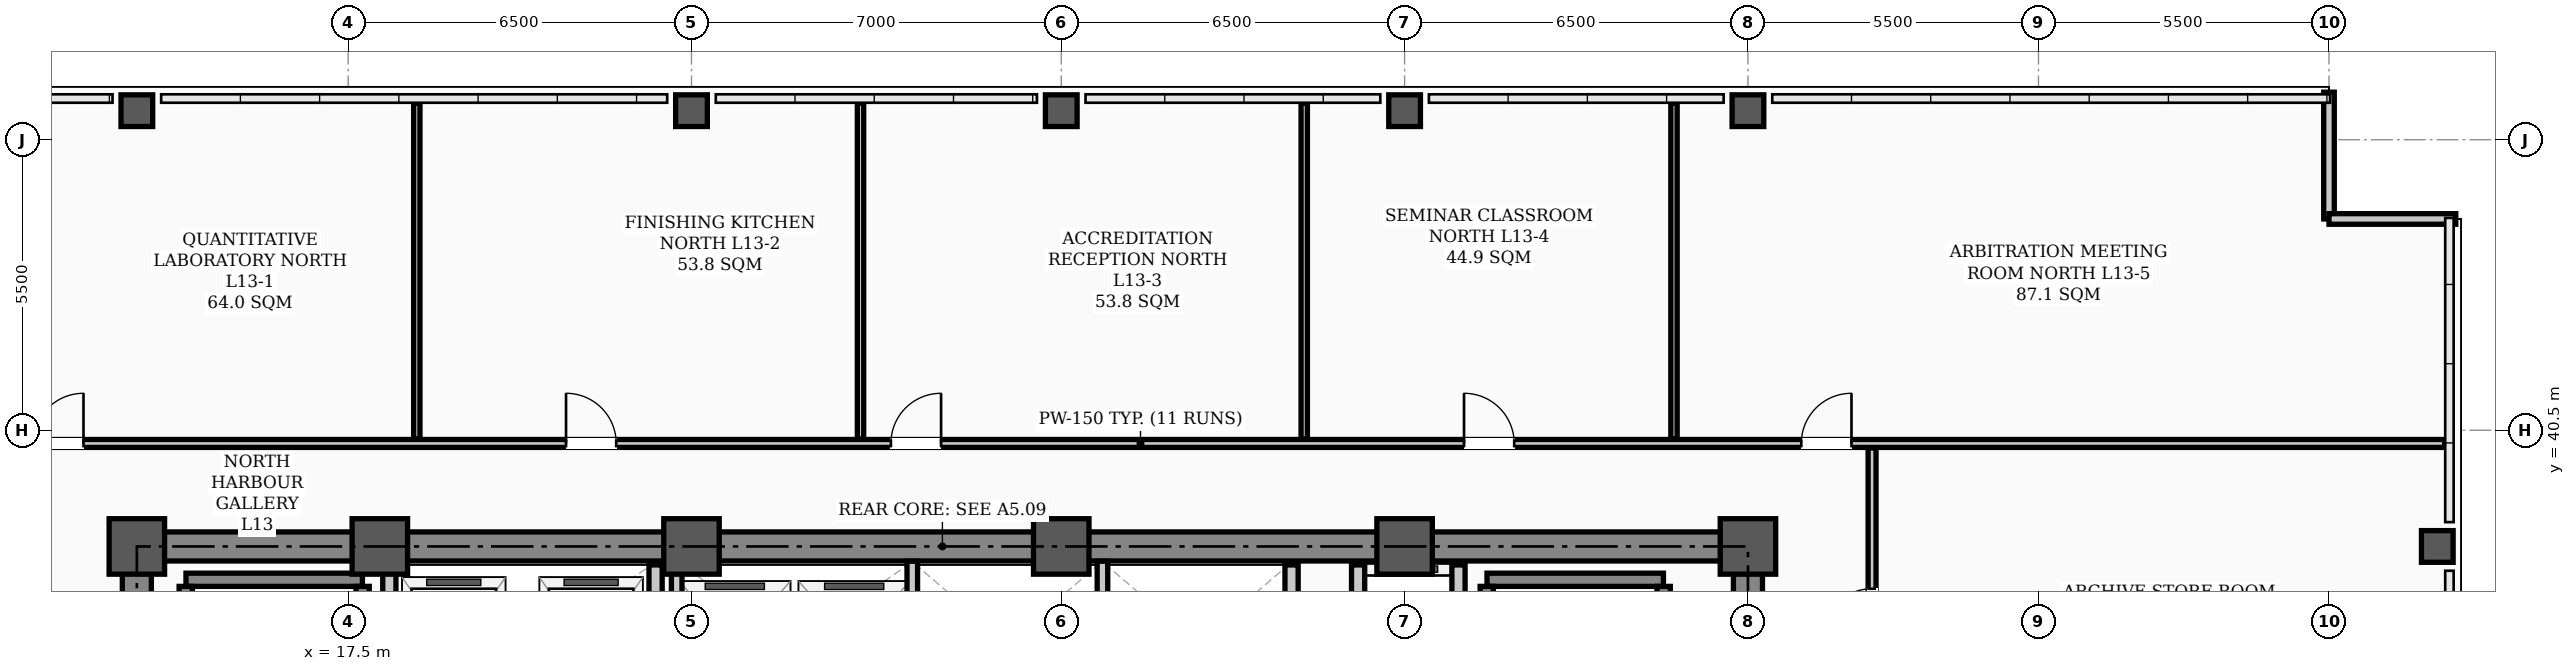
"""IFC4 building model, lengths in metres.
Left out: names, types, materials, properties, quantities, classifications, styles, units other than length and angle.
Written with IfcOpenShell. Run it as: python <this file> out.ifc"""

import sys

from ifc_helpers import new_model, si_unit, direction, frame, frame_2d, origin, origin_2d, place, context, subcontext, project, spatial, rectangle, hollow_rectangle, extrude, element, fill, save


model = new_model("IFC4")
c1 = context("Model", 3, precision=1e-05, world=origin(), true_north=direction((0.0, 1.0)))
c2 = subcontext(c1, "Body", "Model", "MODEL_VIEW")
j1 = project(units=[si_unit("LENGTHUNIT", "METRE"), si_unit("PLANEANGLEUNIT", "RADIAN")], contexts=[c1])
p1 = place(None, origin())
s1 = spatial("IfcSite", under=j1, at=p1, CompositionType="ELEMENT")
p2 = place(p1, origin())
s2 = spatial("IfcBuilding", under=s1, at=p2, CompositionType="ELEMENT")
p3 = place(p2, frame((0.0, 0.0, 53.8)))
s3 = spatial("IfcBuildingStorey", under=s2, at=p3, CompositionType="ELEMENT", Elevation=53.8)
for number, where, z_axis, x_axis in (
    (1, (13.5, 38.3, 0.0), (0.0, 0.0, 1.0), (1.0, 0.0, 0.0)),
    (2, (18.1, 38.3, 0.0), (0.0, 0.0, 1.0), (1.0, 0.0, 0.0)),
    (3, (24.0, 38.3, 0.0), (0.0, 0.0, 1.0), (1.0, 0.0, 0.0)),
    (4, (31.0, 38.3, 0.0), (0.0, 0.0, 1.0), (1.0, 0.0, 0.0)),
    (5, (37.5, 38.3, 0.0), (0.0, 0.0, 1.0), (1.0, 0.0, 0.0)),
    (6, (44.0, 38.3, 0.0), (0.0, 0.0, 1.0), (1.0, 0.0, 0.0)),
):
    element("IfcColumn", number, at=place(p3, frame(where, z_axis=z_axis, x_axis=x_axis)), inside=s3, PredefinedType="COLUMN", context=c2, shape_type="SweptSolid", body=[
        extrude(hollow_rectangle(XDim=1.05, YDim=1.05, WallThickness=0.038, InnerFilletRadius=0.019, OuterFilletRadius=0.057, at=origin_2d()), origin(), (0.0, 0.0, 1.0), 3.9),
    ])
for number, where, z_axis, x_axis in (
    (7, (13.5, 46.55, 0.0), (0.0, 0.0, 1.0), (1.0, 0.0, 0.0)),
    (8, (24.0, 46.55, 0.0), (0.0, 0.0, 1.0), (1.0, 0.0, 0.0)),
    (9, (31.0, 46.55, 0.0), (0.0, 0.0, 1.0), (1.0, 0.0, 0.0)),
    (10, (37.5, 46.55, 0.0), (0.0, 0.0, 1.0), (1.0, 0.0, 0.0)),
    (11, (44.0, 46.55, 0.0), (0.0, 0.0, 1.0), (1.0, 0.0, 0.0)),
    (12, (57.05, 38.3, 0.0), (0.0, 0.0, 1.0), (1.0, 0.0, 0.0)),
):
    element("IfcColumn", number, at=place(p3, frame(where, z_axis=z_axis, x_axis=x_axis)), inside=s3, PredefinedType="COLUMN", context=c2, shape_type="SweptSolid", body=[
        extrude(hollow_rectangle(XDim=0.6, YDim=0.6, WallThickness=0.026, InnerFilletRadius=0.013, OuterFilletRadius=0.039, at=origin_2d()), origin(), (0.0, 0.0, 1.0), 3.9),
    ])
for number, where, z_axis, x_axis in (
    (13, (55.0, 46.9, 0.0), (0.0, 0.0, 1.0), (0.0, -1.0, 0.0)),
    (14, (55.0, 44.5, 0.0), (0.0, 0.0, 1.0), (1.0, 0.0, 0.0)),
):
    element("IfcWall", number, at=place(p3, frame(where, z_axis=z_axis, x_axis=x_axis)), inside=s3, PredefinedType="PARAPET", context=c2, shape_type="SweptSolid", body=[
        extrude(rectangle(XDim=2.4, YDim=0.2, at=frame_2d((1.2, 0.0))), origin(), (0.0, 0.0, 1.0), 1.2),
    ])
p4 = place(p3, frame((13.5, 38.3, 0.0), z_axis=(0.0, 0.0, 1.0), x_axis=(1.0, 0.0, 0.0)))
e15 = element("IfcWall", 15, at=p4, inside=s3, PredefinedType="SHEAR", context=c2, shape_type="SweptSolid", body=[
    extrude(rectangle(XDim=30.5, YDim=0.55, at=frame_2d((15.25, 0.0))), origin(), (0.0, 0.0, 1.0), 3.72),
])
for number, where, z_axis, x_axis in (
    (16, (13.5, 29.35, 0.0), (0.0, 0.0, 1.0), (0.0, 1.0, 0.0)),
    (17, (44.0, 29.35, 0.0), (0.0, 0.0, 1.0), (0.0, 1.0, 0.0)),
):
    element("IfcWall", number, at=place(p3, frame(where, z_axis=z_axis, x_axis=x_axis)), inside=s3, PredefinedType="SHEAR", context=c2, shape_type="SweptSolid", body=[
        extrude(rectangle(XDim=8.6, YDim=0.55, at=frame_2d((4.3, 0.0))), origin(), (0.0, 0.0, 1.0), 3.72),
    ])
p5 = place(p3, frame((14.43, 37.669, 0.0), z_axis=(0.0, 0.0, 1.0), x_axis=(1.0, 0.0, 0.0)))
e18 = element("IfcWall", 18, at=p5, inside=s3, PredefinedType="STANDARD", context=c2, shape_type="SweptSolid", body=[
    extrude(rectangle(XDim=3.34, YDim=0.25, at=frame_2d((1.67, 0.0))), origin(), (0.0, 0.0, 1.0), 3.72),
])
for number, where, z_axis, x_axis in (
    (19, (14.425, 30.36, 0.0), (0.0, 0.0, 1.0), (0.0, 1.0, 0.0)),
    (20, (17.775, 30.36, 0.0), (0.0, 0.0, 1.0), (0.0, 1.0, 0.0)),
):
    element("IfcWall", number, at=place(p3, frame(where, z_axis=z_axis, x_axis=x_axis)), inside=s3, PredefinedType="STANDARD", context=c2, shape_type="SweptSolid", body=[
        extrude(rectangle(XDim=7.184, YDim=0.25, at=frame_2d((3.592, 0.0))), origin(), (0.0, 0.0, 1.0), 3.72),
    ])
p6 = place(p3, frame((39.06, 37.669, 0.0), z_axis=(0.0, 0.0, 1.0), x_axis=(1.0, 0.0, 0.0)))
e21 = element("IfcWall", 21, at=p6, inside=s3, PredefinedType="STANDARD", context=c2, shape_type="SweptSolid", body=[
    extrude(rectangle(XDim=3.34, YDim=0.25, at=frame_2d((1.67, 0.0))), origin(), (0.0, 0.0, 1.0), 3.72),
])
for number, where, z_axis, x_axis in (
    (22, (39.055, 30.36, 0.0), (0.0, 0.0, 1.0), (0.0, 1.0, 0.0)),
    (23, (42.405, 30.36, 0.0), (0.0, 0.0, 1.0), (0.0, 1.0, 0.0)),
):
    element("IfcWall", number, at=place(p3, frame(where, z_axis=z_axis, x_axis=x_axis)), inside=s3, PredefinedType="STANDARD", context=c2, shape_type="SweptSolid", body=[
        extrude(rectangle(XDim=7.184, YDim=0.25, at=frame_2d((3.592, 0.0))), origin(), (0.0, 0.0, 1.0), 3.72),
    ])
p7 = place(p3, frame((36.62, 31.95, 0.0), z_axis=(0.0, 0.0, 1.0), x_axis=(0.0, 1.0, 0.0)))
e24 = element("IfcWall", 24, at=p7, inside=s3, PredefinedType="STANDARD", context=c2, shape_type="SweptSolid", body=[
    extrude(rectangle(XDim=6.0, YDim=0.25, at=frame_2d((3.0, 0.0))), origin(), (0.0, 0.0, 1.0), 3.3),
])
p8 = place(p7, frame((0.9, 0.0, 0.0)))
e25 = element("IfcOpeningElement", 25, at=p8, cuts=e24, PredefinedType="OPENING", context=c2, shape_type="SweptSolid", body=[
    extrude(rectangle(XDim=1.1, YDim=2.08, at=frame_2d((0.55, 1.04))), frame((0.0, 0.135, 0.0), z_axis=(0.0, -1.0, 0.0), x_axis=(1.0, 0.0, 0.0)), (0.0, 0.0, 1.0), 0.27),
])
p9 = place(p7, frame((4.0, 0.0, 0.0)))
e26 = element("IfcOpeningElement", 26, at=p9, cuts=e24, PredefinedType="OPENING", context=c2, shape_type="SweptSolid", body=[
    extrude(rectangle(XDim=1.1, YDim=2.08, at=frame_2d((0.55, 1.04))), frame((0.0, 0.135, 0.0), z_axis=(0.0, -1.0, 0.0), x_axis=(1.0, 0.0, 0.0)), (0.0, 0.0, 1.0), 0.27),
])
p10 = place(p3, frame((38.52, 31.95, 0.0), z_axis=(0.0, 0.0, 1.0), x_axis=(0.0, 1.0, 0.0)))
e27 = element("IfcWall", 27, at=p10, inside=s3, PredefinedType="STANDARD", context=c2, shape_type="SweptSolid", body=[
    extrude(rectangle(XDim=6.0, YDim=0.25, at=frame_2d((3.0, 0.0))), origin(), (0.0, 0.0, 1.0), 3.3),
])
for number, where, z_axis, x_axis in (
    (28, (18.28, 34.62, 0.0), (0.0, 0.0, 1.0), (0.0, 1.0, 0.0)),
    (29, (23.32, 34.62, 0.0), (0.0, 0.0, 1.0), (0.0, 1.0, 0.0)),
):
    element("IfcWall", number, at=place(p3, frame(where, z_axis=z_axis, x_axis=x_axis)), inside=s3, PredefinedType="STANDARD", context=c2, shape_type="SweptSolid", body=[
        extrude(rectangle(XDim=3.33, YDim=0.25, at=frame_2d((1.665, 0.0))), origin(), (0.0, 0.0, 1.0), 3.3),
    ])
p11 = place(p3, frame((35.36, 34.9, 0.0), z_axis=(0.0, 0.0, 1.0), x_axis=(0.0, 1.0, 0.0)))
e30 = element("IfcWall", 30, at=p11, inside=s3, PredefinedType="STANDARD", context=c2, shape_type="SweptSolid", body=[
    extrude(rectangle(XDim=3.05, YDim=0.25, at=frame_2d((1.525, 0.0))), origin(), (0.0, 0.0, 1.0), 3.3),
])
p12 = place(p3, frame((7.81, 40.25, 0.0), z_axis=(0.0, 0.0, 1.0), x_axis=(1.0, 0.0, 0.0)))
e31 = element("IfcWall", 31, at=p12, inside=s3, PredefinedType="PARTITIONING", context=c2, shape_type="SweptSolid", body=[
    extrude(rectangle(XDim=49.38, YDim=0.15, at=frame_2d((24.69, 0.0))), origin(), (0.0, 0.0, 1.0), 3.1),
])
p13 = place(p12, frame((3.73, 0.0, 0.0)))
e32 = element("IfcOpeningElement", 32, at=p13, cuts=e31, PredefinedType="OPENING", context=c2, shape_type="SweptSolid", body=[
    extrude(rectangle(XDim=0.95, YDim=2.08, at=frame_2d((0.475, 1.04))), frame((0.0, 0.085, 0.0), z_axis=(0.0, -1.0, 0.0), x_axis=(1.0, 0.0, 0.0)), (0.0, 0.0, 1.0), 0.17),
])
p14 = place(p12, frame((13.815, 0.0, 0.0)))
e33 = element("IfcOpeningElement", 33, at=p14, cuts=e31, PredefinedType="OPENING", context=c2, shape_type="SweptSolid", body=[
    extrude(rectangle(XDim=0.95, YDim=2.08, at=frame_2d((0.475, 1.04))), frame((0.0, 0.085, 0.0), z_axis=(0.0, -1.0, 0.0), x_axis=(1.0, 0.0, 0.0)), (0.0, 0.0, 1.0), 0.17),
])
p15 = place(p12, frame((19.965, 0.0, 0.0)))
e34 = element("IfcOpeningElement", 34, at=p15, cuts=e31, PredefinedType="OPENING", context=c2, shape_type="SweptSolid", body=[
    extrude(rectangle(XDim=0.95, YDim=2.08, at=frame_2d((0.475, 1.04))), frame((0.0, 0.085, 0.0), z_axis=(0.0, -1.0, 0.0), x_axis=(1.0, 0.0, 0.0)), (0.0, 0.0, 1.0), 0.17),
])
p16 = place(p12, frame((30.815, 0.0, 0.0)))
e35 = element("IfcOpeningElement", 35, at=p16, cuts=e31, PredefinedType="OPENING", context=c2, shape_type="SweptSolid", body=[
    extrude(rectangle(XDim=0.95, YDim=2.08, at=frame_2d((0.475, 1.04))), frame((0.0, 0.085, 0.0), z_axis=(0.0, -1.0, 0.0), x_axis=(1.0, 0.0, 0.0)), (0.0, 0.0, 1.0), 0.17),
])
p17 = place(p12, frame((37.2, 0.0, 0.0)))
e36 = element("IfcOpeningElement", 36, at=p17, cuts=e31, PredefinedType="OPENING", context=c2, shape_type="SweptSolid", body=[
    extrude(rectangle(XDim=0.95, YDim=2.08, at=frame_2d((0.475, 1.04))), frame((0.0, 0.085, 0.0), z_axis=(0.0, -1.0, 0.0), x_axis=(1.0, 0.0, 0.0)), (0.0, 0.0, 1.0), 0.17),
])
p18 = place(p3, frame((46.35, 17.635, 0.0), z_axis=(0.0, 0.0, 1.0), x_axis=(0.0, 1.0, 0.0)))
e37 = element("IfcWall", 37, at=p18, inside=s3, PredefinedType="PARTITIONING", context=c2, shape_type="SweptSolid", body=[
    extrude(rectangle(XDim=22.53, YDim=0.15, at=frame_2d((11.265, 0.0))), origin(), (0.0, 0.0, 1.0), 3.0),
])
p19 = place(p18, frame((4.265, 0.0, 0.0)))
e38 = element("IfcOpeningElement", 38, at=p19, cuts=e37, PredefinedType="OPENING", context=c2, shape_type="SweptSolid", body=[
    extrude(rectangle(XDim=0.95, YDim=2.08, at=frame_2d((0.475, 1.04))), frame((0.0, 0.085, 0.0), z_axis=(0.0, -1.0, 0.0), x_axis=(1.0, 0.0, 0.0)), (0.0, 0.0, 1.0), 0.17),
])
p20 = place(p18, frame((12.39, 0.0, 0.0)))
e39 = element("IfcOpeningElement", 39, at=p20, cuts=e37, PredefinedType="OPENING", context=c2, shape_type="SweptSolid", body=[
    extrude(rectangle(XDim=0.95, YDim=2.08, at=frame_2d((0.475, 1.04))), frame((0.0, 0.085, 0.0), z_axis=(0.0, -1.0, 0.0), x_axis=(1.0, 0.0, 0.0)), (0.0, 0.0, 1.0), 0.17),
])
p21 = place(p18, frame((18.915, 0.0, 0.0)))
e40 = element("IfcOpeningElement", 40, at=p21, cuts=e37, PredefinedType="OPENING", context=c2, shape_type="SweptSolid", body=[
    extrude(rectangle(XDim=0.95, YDim=2.08, at=frame_2d((0.475, 1.04))), frame((0.0, 0.085, 0.0), z_axis=(0.0, -1.0, 0.0), x_axis=(1.0, 0.0, 0.0)), (0.0, 0.0, 1.0), 0.17),
])
for number, where, z_axis, x_axis in (
    (41, (18.8, 40.335, 0.0), (0.0, 0.0, 1.0), (0.0, 1.0, 0.0)),
    (42, (27.2, 40.335, 0.0), (0.0, 0.0, 1.0), (0.0, 1.0, 0.0)),
    (43, (35.6, 40.335, 0.0), (0.0, 0.0, 1.0), (0.0, 1.0, 0.0)),
    (44, (42.6, 40.335, 0.0), (0.0, 0.0, 1.0), (0.0, 1.0, 0.0)),
):
    element("IfcWall", number, at=place(p3, frame(where, z_axis=z_axis, x_axis=x_axis)), inside=s3, PredefinedType="PARTITIONING", context=c2, shape_type="SweptSolid", body=[
        extrude(rectangle(XDim=6.355, YDim=0.12, at=frame_2d((3.177, 0.0))), origin(), (0.0, 0.0, 1.0), 3.212),
    ])
p22 = place(p3, frame((23.72, 34.9, 0.0), z_axis=(0.0, 0.0, 1.0), x_axis=(0.0, 1.0, 0.0)))
e45 = element("IfcWall", 45, at=p22, inside=s3, PredefinedType="STANDARD", context=c2, shape_type="SweptSolid", body=[
    extrude(rectangle(XDim=3.12, YDim=0.2, at=frame_2d((1.56, 0.0))), origin(), (0.0, 0.0, 1.0), 3.1),
])
for number, where, z_axis, x_axis in (
    (46, (28.18, 34.9, 0.0), (0.0, 0.0, 1.0), (0.0, 1.0, 0.0)),
    (47, (31.78, 34.9, 0.0), (0.0, 0.0, 1.0), (0.0, 1.0, 0.0)),
):
    element("IfcWall", number, at=place(p3, frame(where, z_axis=z_axis, x_axis=x_axis)), inside=s3, PredefinedType="STANDARD", context=c2, shape_type="SweptSolid", body=[
        extrude(rectangle(XDim=3.12, YDim=0.2, at=frame_2d((1.56, 0.0))), origin(), (0.0, 0.0, 1.0), 3.3),
    ])
p23 = place(p21, origin())
e48 = element("IfcDoor", 48, at=p23, inside=s3, OperationType="SINGLE_SWING_LEFT", PredefinedType="DOOR", context=c2, shape_type="SweptSolid", body=[
    extrude(rectangle(XDim=0.95, YDim=2.08, at=frame_2d((0.475, 1.04))), frame((0.0, 0.025, 0.0), z_axis=(0.0, -1.0, 0.0), x_axis=(1.0, 0.0, 0.0)), (0.0, 0.0, 1.0), 0.05),
])
fill(e40, e48)
p24 = place(p13, origin())
e49 = element("IfcDoor", 49, at=p24, inside=s3, OperationType="SINGLE_SWING_RIGHT", PredefinedType="DOOR", context=c2, shape_type="SweptSolid", body=[
    extrude(rectangle(XDim=0.95, YDim=2.08, at=frame_2d((0.475, 1.04))), frame((0.0, 0.025, 0.0), z_axis=(0.0, -1.0, 0.0), x_axis=(1.0, 0.0, 0.0)), (0.0, 0.0, 1.0), 0.05),
])
fill(e32, e49)
p25 = place(p14, origin())
e50 = element("IfcDoor", 50, at=p25, inside=s3, OperationType="SINGLE_SWING_LEFT", PredefinedType="DOOR", context=c2, shape_type="SweptSolid", body=[
    extrude(rectangle(XDim=0.95, YDim=2.08, at=frame_2d((0.475, 1.04))), frame((0.0, 0.025, 0.0), z_axis=(0.0, -1.0, 0.0), x_axis=(1.0, 0.0, 0.0)), (0.0, 0.0, 1.0), 0.05),
])
fill(e33, e50)
p26 = place(p15, origin())
e51 = element("IfcDoor", 51, at=p26, inside=s3, OperationType="SINGLE_SWING_RIGHT", PredefinedType="DOOR", context=c2, shape_type="SweptSolid", body=[
    extrude(rectangle(XDim=0.95, YDim=2.08, at=frame_2d((0.475, 1.04))), frame((0.0, 0.025, 0.0), z_axis=(0.0, -1.0, 0.0), x_axis=(1.0, 0.0, 0.0)), (0.0, 0.0, 1.0), 0.05),
])
fill(e34, e51)
p27 = place(p16, origin())
e52 = element("IfcDoor", 52, at=p27, inside=s3, OperationType="SINGLE_SWING_LEFT", PredefinedType="DOOR", context=c2, shape_type="SweptSolid", body=[
    extrude(rectangle(XDim=0.95, YDim=2.08, at=frame_2d((0.475, 1.04))), frame((0.0, 0.025, 0.0), z_axis=(0.0, -1.0, 0.0), x_axis=(1.0, 0.0, 0.0)), (0.0, 0.0, 1.0), 0.05),
])
fill(e35, e52)
p28 = place(p17, origin())
e53 = element("IfcDoor", 53, at=p28, inside=s3, OperationType="SINGLE_SWING_RIGHT", PredefinedType="DOOR", context=c2, shape_type="SweptSolid", body=[
    extrude(rectangle(XDim=0.95, YDim=2.08, at=frame_2d((0.475, 1.04))), frame((0.0, 0.025, 0.0), z_axis=(0.0, -1.0, 0.0), x_axis=(1.0, 0.0, 0.0)), (0.0, 0.0, 1.0), 0.05),
])
fill(e36, e53)
save(model, sys.argv[1])
